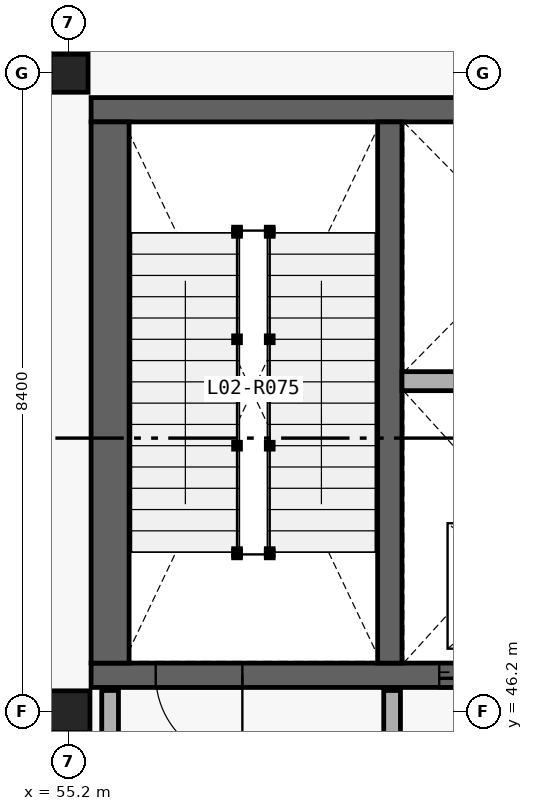
"""IFC4 building model, lengths in metres.
Left out: names, types, materials, properties, quantities, classifications, styles, units other than length and angle.
Written with IfcOpenShell. Run it as: python <this file> out.ifc"""

import sys

from ifc_helpers import new_model, si_unit, direction, frame, frame_2d, origin_with_axes, origin_2d_with_axis, place, context, subcontext, project, spatial, rectangle, i_section, extrude, element, fill, save


model = new_model("IFC4")
c1 = context("Model", 3, precision=1e-05, world=origin_with_axes(), true_north=direction((0.0, 1.0)))
c2 = subcontext(c1, "Body", "Model", "MODEL_VIEW")
j1 = project(units=[si_unit("LENGTHUNIT", "METRE"), si_unit("PLANEANGLEUNIT", "RADIAN")], contexts=[c1])
p1 = place(None, origin_with_axes())
s1 = spatial("IfcSite", under=j1, at=p1, CompositionType="ELEMENT")
p2 = place(p1, origin_with_axes())
s2 = spatial("IfcBuilding", under=s1, at=p2, CompositionType="ELEMENT")
p3 = place(p2, frame((0.0, 0.0, 10.8), z_axis=(0.0, 0.0, 1.0), x_axis=(1.0, 0.0, 0.0)))
s3 = spatial("IfcBuildingStorey", under=s2, at=p3, CompositionType="ELEMENT", Elevation=10.8)
p4 = place(None, frame((55.49, 46.68, 10.8), z_axis=(0.0, 0.0, 1.0), x_axis=(1.0, 0.0, 0.0)))
e1 = element("IfcWall", 1, at=p4, inside=s3, PredefinedType="SHEAR", context=c2, shape_type="SweptSolid", body=[
    extrude(rectangle(XDim=7.82, YDim=0.32, at=frame_2d((3.91, 0.0), x_axis=(1.0, 0.0))), origin_with_axes(), (0.0, 0.0, 1.0), 4.8),
])
p5 = place(None, frame((56.91, 46.68, 10.8), z_axis=(0.0, 0.0, 1.0), x_axis=(1.0, 0.0, 0.0)))
e2 = element("IfcOpeningElement", 2, at=p5, cuts=e1, PredefinedType="OPENING", context=c2, shape_type="SweptSolid", body=[
    extrude(rectangle(XDim=1.14, YDim=2.18, at=frame_2d((0.0, 1.09), x_axis=(1.0, 0.0))), frame((0.0, 0.17, 0.0), z_axis=(0.0, -1.0, 0.0), x_axis=(1.0, 0.0, 0.0)), (0.0, 0.0, 1.0), 0.34),
])
p6 = place(None, frame((60.65, 46.68, 10.8), z_axis=(0.0, 0.0, 1.0), x_axis=(1.0, 0.0, 0.0)))
e3 = element("IfcOpeningElement", 3, at=p6, cuts=e1, PredefinedType="OPENING", context=c2, shape_type="SweptSolid", body=[
    extrude(rectangle(XDim=1.16, YDim=2.2, at=frame_2d((0.0, 1.1), x_axis=(1.0, 0.0))), frame((0.0, 0.17, 0.0), z_axis=(0.0, -1.0, 0.0), x_axis=(1.0, 0.0, 0.0)), (0.0, 0.0, 1.0), 0.34),
])
p7 = place(None, frame((63.31, 54.12, 10.8), z_axis=(0.0, 0.0, 1.0), x_axis=(-1.0, 0.0, 0.0)))
e4 = element("IfcWall", 4, at=p7, inside=s3, PredefinedType="SHEAR", context=c2, shape_type="SweptSolid", body=[
    extrude(rectangle(XDim=7.82, YDim=0.32, at=frame_2d((3.91, 0.0), x_axis=(1.0, 0.0))), origin_with_axes(), (0.0, 0.0, 1.0), 4.8),
])
p8 = place(None, frame((55.74, 53.96, 10.8), z_axis=(0.0, 0.0, 1.0), x_axis=(0.0, -1.0, 0.0)))
e5 = element("IfcWall", 5, at=p8, inside=s3, PredefinedType="SHEAR", context=c2, shape_type="SweptSolid", body=[
    extrude(rectangle(XDim=7.12, YDim=0.5, at=frame_2d((3.56, 0.0), x_axis=(1.0, 0.0))), origin_with_axes(), (0.0, 0.0, 1.0), 4.8),
])
p9 = place(None, frame((59.42, 46.84, 10.8), z_axis=(0.0, 0.0, 1.0), x_axis=(0.0, 1.0, 0.0)))
e6 = element("IfcWall", 6, at=p9, inside=s3, PredefinedType="SHEAR", context=c2, shape_type="SweptSolid", body=[
    extrude(rectangle(XDim=7.12, YDim=0.32, at=frame_2d((3.56, 0.0), x_axis=(1.0, 0.0))), origin_with_axes(), (0.0, 0.0, 1.0), 4.8),
])
p10 = place(None, frame((59.58, 50.549, 10.8), z_axis=(0.0, 0.0, 1.0), x_axis=(1.0, 0.0, 0.0)))
e7 = element("IfcWall", 7, at=p10, inside=s3, PredefinedType="PARTITIONING", context=c2, shape_type="SweptSolid", body=[
    extrude(rectangle(XDim=3.23, YDim=0.25, at=frame_2d((1.615, 0.0), x_axis=(1.0, 0.0))), origin_with_axes(), (0.0, 0.0, 1.0), 4.44),
])
for number, where, z_axis, x_axis in (
    (8, (55.74, 45.22, 10.8), (0.0, 0.0, 1.0), (0.0, 1.0, 0.0)),
    (9, (59.45, 45.22, 10.8), (0.0, 0.0, 1.0), (0.0, 1.0, 0.0)),
):
    element("IfcWall", number, at=place(None, frame(where, z_axis=z_axis, x_axis=x_axis)), inside=s3, PredefinedType="PARTITIONING", context=c2, shape_type="SweptSolid", body=[
        extrude(rectangle(XDim=1.26, YDim=0.22, at=frame_2d((0.63, 0.0), x_axis=(1.0, 0.0))), origin_with_axes(), (0.0, 0.0, 1.0), 4.44),
    ])
p11 = place(None, frame((55.2, 46.2, 10.8), z_axis=(0.0, 0.0, 1.0), x_axis=(1.0, 0.0, 0.0)))
e10 = element("IfcColumn", 10, at=p11, inside=s3, PredefinedType="COLUMN", context=c2, shape_type="SweptSolid", body=[
    extrude(i_section(OverallWidth=0.55, OverallDepth=0.55, WebThickness=0.025, FlangeThickness=0.042, at=origin_2d_with_axis()), origin_with_axes(), (0.0, 0.0, 1.0), 4.8),
])
p12 = place(None, frame((55.2, 54.6, 10.8), z_axis=(0.0, 0.0, 1.0), x_axis=(1.0, 0.0, 0.0)))
e11 = element("IfcColumn", 11, at=p12, inside=s3, PredefinedType="COLUMN", context=c2, shape_type="SweptSolid", body=[
    extrude(i_section(OverallWidth=0.5, OverallDepth=0.5, WebThickness=0.022, FlangeThickness=0.036, at=origin_2d_with_axis()), origin_with_axes(), (0.0, 0.0, 1.0), 4.8),
])
p13 = place(None, frame((56.91, 46.68, 10.8), z_axis=(0.0, 0.0, 1.0), x_axis=(-1.0, 0.0, 0.0)))
e12 = element("IfcDoor", 12, at=p13, inside=s3, OperationType="SINGLE_SWING_RIGHT", PredefinedType="DOOR", context=c2, shape_type="SweptSolid", body=[
    extrude(rectangle(XDim=1.14, YDim=2.18, at=frame_2d((0.0, 1.09), x_axis=(1.0, 0.0))), frame((0.0, 0.04, 0.0), z_axis=(0.0, -1.0, 0.0), x_axis=(1.0, 0.0, 0.0)), (0.0, 0.0, 1.0), 0.08),
])
fill(e2, e12)
p14 = place(None, frame((60.65, 46.68, 10.8), z_axis=(0.0, 0.0, 1.0), x_axis=(-1.0, 0.0, 0.0)))
e13 = element("IfcDoor", 13, at=p14, inside=s3, OperationType="SLIDING_TO_LEFT", PredefinedType="DOOR", context=c2, shape_type="SweptSolid", body=[
    extrude(rectangle(XDim=1.16, YDim=2.2, at=frame_2d((0.0, 1.1), x_axis=(1.0, 0.0))), frame((0.0, 0.04, 0.0), z_axis=(0.0, -1.0, 0.0), x_axis=(1.0, 0.0, 0.0)), (0.0, 0.0, 1.0), 0.08),
])
fill(e3, e13)
save(model, sys.argv[1])
